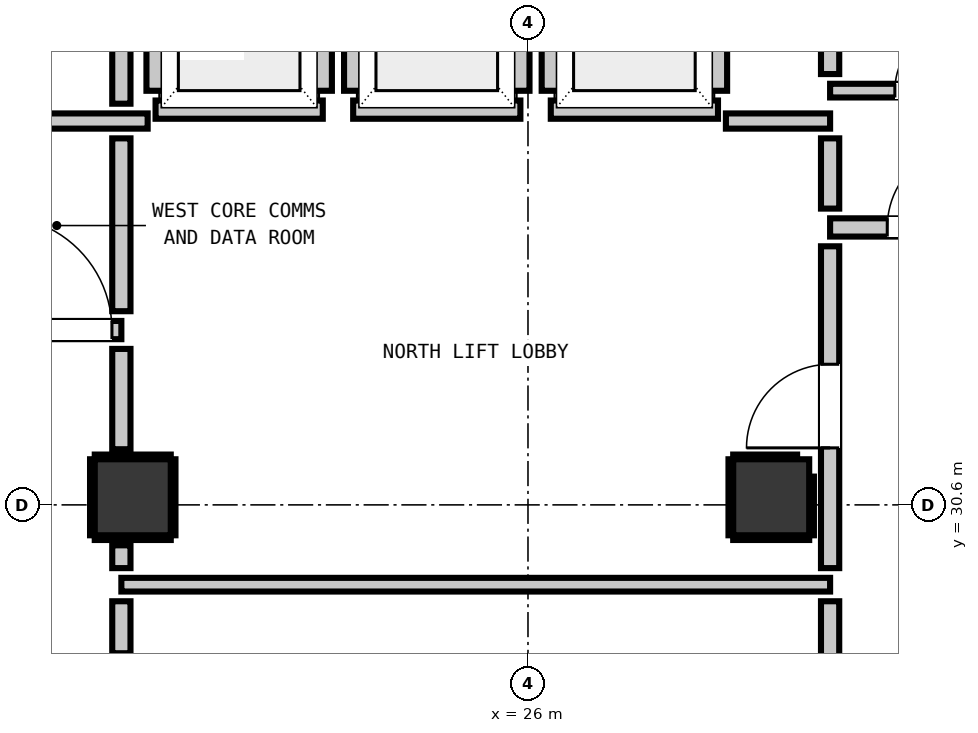
"""IFC4 building model, lengths in metres.
Left out: names, types, materials, properties, quantities, classifications, styles, units other than length and angle.
Written with IfcOpenShell. Run it as: python <this file> out.ifc"""

import sys

from ifc_helpers import new_model, si_unit, direction, frame, frame_2d, origin, origin_2d, place, context, subcontext, project, spatial, rectangle, extrude, element, fill, save


model = new_model("IFC4")
c1 = context("Model", 3, precision=1e-05, world=origin(), true_north=direction((0.0, 1.0)))
c2 = subcontext(c1, "Body", "Model", "MODEL_VIEW")
j1 = project(units=[si_unit("LENGTHUNIT", "METRE"), si_unit("PLANEANGLEUNIT", "RADIAN")], contexts=[c1])
p1 = place(None, origin())
s1 = spatial("IfcSite", under=j1, at=p1, CompositionType="ELEMENT")
p2 = place(p1, origin())
s2 = spatial("IfcBuilding", under=s1, at=p2, CompositionType="ELEMENT")
p3 = place(p2, frame((0.0, 0.0, 28.64)))
s3 = spatial("IfcBuildingStorey", under=s2, at=p3, CompositionType="ELEMENT", Elevation=28.64)
for number, where, z_axis, x_axis in (
    (1, (20.8, 30.7, 0.0), (0.0, 0.0, 1.0), (1.0, 0.0, 0.0)),
    (2, (29.2, 30.7, 0.0), (0.0, 0.0, 1.0), (1.0, 0.0, 0.0)),
):
    element("IfcColumn", number, at=place(p3, frame(where, z_axis=z_axis, x_axis=x_axis)), inside=s3, PredefinedType="COLUMN", context=c2, shape_type="SweptSolid", body=[
        extrude(rectangle(XDim=1.0, YDim=1.0, at=origin_2d()), origin(), (0.0, 0.0, 1.0), 3.32),
    ])
p4 = place(p3, frame((21.1, 35.8, 0.0), z_axis=(0.0, 0.0, 1.0), x_axis=(1.0, 0.0, 0.0)))
e3 = element("IfcWall", 3, at=p4, inside=s3, PredefinedType="PARTITIONING", context=c2, shape_type="SweptSolid", body=[
    extrude(rectangle(XDim=2.2, YDim=0.24, at=frame_2d((1.1, 0.0))), origin(), (0.0, 0.0, 1.0), 3.06),
])
p5 = place(p3, frame((21.1, 36.048, 0.0), z_axis=(0.0, 0.0, 1.0), x_axis=(0.0, 1.0, 0.0)))
e4 = element("IfcWall", 4, at=p5, inside=s3, PredefinedType="PARTITIONING", context=c2, shape_type="SweptSolid", body=[
    extrude(rectangle(XDim=2.104, YDim=0.24, at=frame_2d((1.052, 0.0))), origin(), (0.0, 0.0, 1.0), 2.295),
])
p6 = place(p3, frame((23.3, 36.048, 0.0), z_axis=(0.0, 0.0, 1.0), x_axis=(0.0, 1.0, 0.0)))
e5 = element("IfcWall", 5, at=p6, inside=s3, PredefinedType="PARTITIONING", context=c2, shape_type="SweptSolid", body=[
    extrude(rectangle(XDim=2.104, YDim=0.24, at=frame_2d((1.052, 0.0))), origin(), (0.0, 0.0, 1.0), 3.06),
])
p7 = place(p3, frame((23.7, 35.8, 0.0), z_axis=(0.0, 0.0, 1.0), x_axis=(1.0, 0.0, 0.0)))
e6 = element("IfcWall", 6, at=p7, inside=s3, PredefinedType="PARTITIONING", context=c2, shape_type="SweptSolid", body=[
    extrude(rectangle(XDim=2.2, YDim=0.24, at=frame_2d((1.1, 0.0))), origin(), (0.0, 0.0, 1.0), 3.06),
])
for number, where, z_axis, x_axis in (
    (7, (23.7, 36.048, 0.0), (0.0, 0.0, 1.0), (0.0, 1.0, 0.0)),
    (8, (25.9, 36.048, 0.0), (0.0, 0.0, 1.0), (0.0, 1.0, 0.0)),
):
    element("IfcWall", number, at=place(p3, frame(where, z_axis=z_axis, x_axis=x_axis)), inside=s3, PredefinedType="PARTITIONING", context=c2, shape_type="SweptSolid", body=[
        extrude(rectangle(XDim=2.104, YDim=0.24, at=frame_2d((1.052, 0.0))), origin(), (0.0, 0.0, 1.0), 3.06),
    ])
p8 = place(p3, frame((26.3, 35.8, 0.0), z_axis=(0.0, 0.0, 1.0), x_axis=(1.0, 0.0, 0.0)))
e9 = element("IfcWall", 9, at=p8, inside=s3, PredefinedType="PARTITIONING", context=c2, shape_type="SweptSolid", body=[
    extrude(rectangle(XDim=2.2, YDim=0.24, at=frame_2d((1.1, 0.0))), origin(), (0.0, 0.0, 1.0), 3.06),
])
for number, where, z_axis, x_axis in (
    (10, (26.3, 36.048, 0.0), (0.0, 0.0, 1.0), (0.0, 1.0, 0.0)),
    (11, (28.5, 36.048, 0.0), (0.0, 0.0, 1.0), (0.0, 1.0, 0.0)),
):
    element("IfcWall", number, at=place(p3, frame(where, z_axis=z_axis, x_axis=x_axis)), inside=s3, PredefinedType="PARTITIONING", context=c2, shape_type="SweptSolid", body=[
        extrude(rectangle(XDim=2.104, YDim=0.24, at=frame_2d((1.052, 0.0))), origin(), (0.0, 0.0, 1.0), 3.06),
    ])
p9 = place(p3, frame((17.45, 32.9, 0.0), z_axis=(0.0, 0.0, 1.0), x_axis=(1.0, 0.0, 0.0)))
e12 = element("IfcWall", 12, at=p9, inside=s3, PredefinedType="PARTITIONING", context=c2, shape_type="SweptSolid", body=[
    extrude(rectangle(XDim=3.2, YDim=0.24, at=frame_2d((1.6, 0.0))), origin(), (0.0, 0.0, 1.0), 3.06),
])
p10 = place(p9, frame((0.159, 0.0, 0.0)))
e13 = element("IfcOpeningElement", 13, at=p10, cuts=e12, PredefinedType="OPENING", context=c2, shape_type="SweptSolid", body=[
    extrude(rectangle(XDim=1.1, YDim=2.15, at=frame_2d((0.55, 1.075))), frame((0.0, 0.13, 0.0), z_axis=(0.0, -1.0, 0.0), x_axis=(1.0, 0.0, 0.0)), (0.0, 0.0, 1.0), 0.26),
])
p11 = place(p9, frame((1.576, 0.0, 0.0)))
e14 = element("IfcOpeningElement", 14, at=p11, cuts=e12, PredefinedType="OPENING", context=c2, shape_type="SweptSolid", body=[
    extrude(rectangle(XDim=1.5, YDim=2.15, at=frame_2d((0.75, 1.075))), frame((0.0, 0.13, 0.0), z_axis=(0.0, -1.0, 0.0), x_axis=(1.0, 0.0, 0.0)), (0.0, 0.0, 1.0), 0.26),
])
p12 = place(p3, frame((29.975, 34.25, 0.0), z_axis=(0.0, 0.0, 1.0), x_axis=(1.0, 0.0, 0.0)))
e15 = element("IfcWall", 15, at=p12, inside=s3, PredefinedType="PARTITIONING", context=c2, shape_type="SweptSolid", body=[
    extrude(rectangle(XDim=2.475, YDim=0.24, at=frame_2d((1.237, 0.0))), origin(), (0.0, 0.0, 1.0), 3.06),
])
p13 = place(p12, frame((0.752, 0.0, 0.0)))
e16 = element("IfcOpeningElement", 16, at=p13, cuts=e15, PredefinedType="OPENING", context=c2, shape_type="SweptSolid", body=[
    extrude(rectangle(XDim=1.1, YDim=2.15, at=frame_2d((0.55, 1.075))), frame((0.0, 0.13, 0.0), z_axis=(0.0, -1.0, 0.0), x_axis=(1.0, 0.0, 0.0)), (0.0, 0.0, 1.0), 0.26),
])
p14 = place(p3, frame((18.95, 35.65, 0.0), z_axis=(0.0, 0.0, 1.0), x_axis=(1.0, 0.0, 0.0)))
e17 = element("IfcWall", 17, at=p14, inside=s3, PredefinedType="PARTITIONING", context=c2, shape_type="SweptSolid", body=[
    extrude(rectangle(XDim=2.046, YDim=0.2, at=frame_2d((1.023, 0.0))), origin(), (0.0, 0.0, 1.0), 3.06),
])
p15 = place(p3, frame((28.604, 35.65, 0.0), z_axis=(0.0, 0.0, 1.0), x_axis=(1.0, 0.0, 0.0)))
e18 = element("IfcWall", 18, at=p15, inside=s3, PredefinedType="PARTITIONING", context=c2, shape_type="SweptSolid", body=[
    extrude(rectangle(XDim=1.371, YDim=0.2, at=frame_2d((0.686, 0.0))), origin(), (0.0, 0.0, 1.0), 3.06),
])
p16 = place(p3, frame((20.65, 29.55, 0.0), z_axis=(0.0, 0.0, 1.0), x_axis=(1.0, 0.0, 0.0)))
e19 = element("IfcWall", 19, at=p16, inside=s3, PredefinedType="PARTITIONING", context=c2, shape_type="SweptSolid", body=[
    extrude(rectangle(XDim=9.325, YDim=0.18, at=frame_2d((4.663, 0.0))), origin(), (0.0, 0.0, 1.0), 3.06),
])
p17 = place(p3, frame((29.975, 36.05, 0.0), z_axis=(0.0, 0.0, 1.0), x_axis=(1.0, 0.0, 0.0)))
e20 = element("IfcWall", 20, at=p17, inside=s3, PredefinedType="PARTITIONING", context=c2, shape_type="SweptSolid", body=[
    extrude(rectangle(XDim=2.505, YDim=0.18, at=frame_2d((1.252, 0.0))), origin(), (0.0, 0.0, 1.0), 3.06),
])
p18 = place(p17, frame((0.852, 0.0, 0.0)))
e21 = element("IfcOpeningElement", 21, at=p18, cuts=e20, PredefinedType="OPENING", context=c2, shape_type="SweptSolid", body=[
    extrude(rectangle(XDim=0.9, YDim=2.1, at=frame_2d((0.45, 1.05))), frame((0.0, 0.1, 0.0), z_axis=(0.0, -1.0, 0.0), x_axis=(1.0, 0.0, 0.0)), (0.0, 0.0, 1.0), 0.2),
])
p19 = place(p3, frame((20.65, 28.648, 0.0), z_axis=(0.0, 0.0, 1.0), x_axis=(0.0, 1.0, 0.0)))
e22 = element("IfcWall", 22, at=p19, inside=s3, PredefinedType="PARTITIONING", context=c2, shape_type="SweptSolid", body=[
    extrude(rectangle(XDim=0.684, YDim=0.24, at=frame_2d((0.342, 0.0))), origin(), (0.0, 0.0, 1.0), 2.295),
])
p20 = place(p3, frame((20.65, 29.768, 0.0), z_axis=(0.0, 0.0, 1.0), x_axis=(0.0, 1.0, 0.0)))
e23 = element("IfcWall", 23, at=p20, inside=s3, PredefinedType="PARTITIONING", context=c2, shape_type="SweptSolid", body=[
    extrude(rectangle(XDim=0.3, YDim=0.24, at=frame_2d((0.15, 0.0))), origin(), (0.0, 0.0, 1.0), 2.295),
])
p21 = place(p3, frame((20.65, 31.332, 0.0), z_axis=(0.0, 0.0, 1.0), x_axis=(0.0, 1.0, 0.0)))
e24 = element("IfcWall", 24, at=p21, inside=s3, PredefinedType="PARTITIONING", context=c2, shape_type="SweptSolid", body=[
    extrude(rectangle(XDim=1.32, YDim=0.24, at=frame_2d((0.66, 0.0))), origin(), (0.0, 0.0, 1.0), 2.295),
])
p22 = place(p3, frame((20.65, 33.148, 0.0), z_axis=(0.0, 0.0, 1.0), x_axis=(0.0, 1.0, 0.0)))
e25 = element("IfcWall", 25, at=p22, inside=s3, PredefinedType="PARTITIONING", context=c2, shape_type="SweptSolid", body=[
    extrude(rectangle(XDim=2.274, YDim=0.24, at=frame_2d((1.137, 0.0))), origin(), (0.0, 0.0, 1.0), 2.295),
])
p23 = place(p3, frame((20.65, 35.878, 0.0), z_axis=(0.0, 0.0, 1.0), x_axis=(0.0, 1.0, 0.0)))
e26 = element("IfcWall", 26, at=p23, inside=s3, PredefinedType="PARTITIONING", context=c2, shape_type="SweptSolid", body=[
    extrude(rectangle(XDim=2.674, YDim=0.24, at=frame_2d((1.337, 0.0))), origin(), (0.0, 0.0, 1.0), 2.295),
])
p24 = place(p3, frame((29.975, 25.648, 0.0), z_axis=(0.0, 0.0, 1.0), x_axis=(0.0, 1.0, 0.0)))
e27 = element("IfcWall", 27, at=p24, inside=s3, PredefinedType="PARTITIONING", context=c2, shape_type="SweptSolid", body=[
    extrude(rectangle(XDim=3.684, YDim=0.24, at=frame_2d((1.842, 0.0))), origin(), (0.0, 0.0, 1.0), 3.06),
])
p25 = place(p3, frame((29.975, 29.768, 0.0), z_axis=(0.0, 0.0, 1.0), x_axis=(0.0, 1.0, 0.0)))
e28 = element("IfcWall", 28, at=p25, inside=s3, PredefinedType="PARTITIONING", context=c2, shape_type="SweptSolid", body=[
    extrude(rectangle(XDim=4.234, YDim=0.24, at=frame_2d((2.117, 0.0))), origin(), (0.0, 0.0, 1.0), 3.06),
])
p26 = place(p25, frame((1.582, 0.0, 0.0)))
e29 = element("IfcOpeningElement", 29, at=p26, cuts=e28, PredefinedType="OPENING", context=c2, shape_type="SweptSolid", body=[
    extrude(rectangle(XDim=1.1, YDim=2.15, at=frame_2d((0.55, 1.075))), frame((0.0, 0.13, 0.0), z_axis=(0.0, -1.0, 0.0), x_axis=(1.0, 0.0, 0.0)), (0.0, 0.0, 1.0), 0.26),
])
p27 = place(p3, frame((29.975, 34.498, 0.0), z_axis=(0.0, 0.0, 1.0), x_axis=(0.0, 1.0, 0.0)))
e30 = element("IfcWall", 30, at=p27, inside=s3, PredefinedType="PARTITIONING", context=c2, shape_type="SweptSolid", body=[
    extrude(rectangle(XDim=0.924, YDim=0.24, at=frame_2d((0.462, 0.0))), origin(), (0.0, 0.0, 1.0), 3.06),
])
p28 = place(p3, frame((29.975, 36.268, 0.0), z_axis=(0.0, 0.0, 1.0), x_axis=(0.0, 1.0, 0.0)))
e31 = element("IfcWall", 31, at=p28, inside=s3, PredefinedType="PARTITIONING", context=c2, shape_type="SweptSolid", body=[
    extrude(rectangle(XDim=2.284, YDim=0.24, at=frame_2d((1.142, 0.0))), origin(), (0.0, 0.0, 1.0), 3.06),
])
for number, where, z_axis, x_axis in (
    (32, (20.3, 30.168, 0.0), (0.0, 0.0, 1.0), (1.0, 0.0, 0.0)),
    (33, (20.3, 31.232, 0.0), (0.0, 0.0, 1.0), (1.0, 0.0, 0.0)),
    (34, (20.268, 30.2, 0.0), (0.0, 0.0, 1.0), (0.0, 1.0, 0.0)),
    (35, (21.332, 30.2, 0.0), (0.0, 0.0, 1.0), (0.0, 1.0, 0.0)),
    (36, (28.7, 30.168, 0.0), (0.0, 0.0, 1.0), (1.0, 0.0, 0.0)),
):
    element("IfcWall", number, at=place(p3, frame(where, z_axis=z_axis, x_axis=x_axis)), inside=s3, PredefinedType="PARTITIONING", context=c2, shape_type="SweptSolid", body=[
        extrude(rectangle(XDim=1.0, YDim=0.06, at=frame_2d((0.5, 0.0))), origin(), (0.0, 0.0, 1.0), 1.45),
    ])
p29 = place(p3, frame((28.7, 31.232, 0.0), z_axis=(0.0, 0.0, 1.0), x_axis=(1.0, 0.0, 0.0)))
e37 = element("IfcWall", 37, at=p29, inside=s3, PredefinedType="PARTITIONING", context=c2, shape_type="SweptSolid", body=[
    extrude(rectangle(XDim=0.841, YDim=0.06, at=frame_2d((0.42, 0.0))), origin(), (0.0, 0.0, 1.0), 1.45),
])
p30 = place(p3, frame((28.668, 30.2, 0.0), z_axis=(0.0, 0.0, 1.0), x_axis=(0.0, 1.0, 0.0)))
e38 = element("IfcWall", 38, at=p30, inside=s3, PredefinedType="PARTITIONING", context=c2, shape_type="SweptSolid", body=[
    extrude(rectangle(XDim=1.0, YDim=0.06, at=frame_2d((0.5, 0.0))), origin(), (0.0, 0.0, 1.0), 1.45),
])
p31 = place(p3, frame((29.732, 30.2, 0.0), z_axis=(0.0, 0.0, 1.0), x_axis=(0.0, 1.0, 0.0)))
e39 = element("IfcWall", 39, at=p31, inside=s3, PredefinedType="PARTITIONING", context=c2, shape_type="SweptSolid", body=[
    extrude(rectangle(XDim=0.772, YDim=0.06, at=frame_2d((0.386, 0.0))), origin(), (0.0, 0.0, 1.0), 1.45),
])
p32 = place(p26, origin())
e40 = element("IfcDoor", 40, at=p32, inside=s3, OperationType="SINGLE_SWING_LEFT", PredefinedType="DOOR", context=c2, shape_type="SweptSolid", body=[
    extrude(rectangle(XDim=1.1, YDim=2.15, at=frame_2d((0.55, 1.075))), frame((0.0, 0.025, 0.0), z_axis=(0.0, -1.0, 0.0), x_axis=(1.0, 0.0, 0.0)), (0.0, 0.0, 1.0), 0.05),
])
fill(e29, e40)
p33 = place(p13, origin())
e41 = element("IfcDoor", 41, at=p33, inside=s3, OperationType="SINGLE_SWING_RIGHT", PredefinedType="DOOR", context=c2, shape_type="SweptSolid", body=[
    extrude(rectangle(XDim=1.1, YDim=2.15, at=frame_2d((0.55, 1.075))), frame((0.0, 0.025, 0.0), z_axis=(0.0, -1.0, 0.0), x_axis=(1.0, 0.0, 0.0)), (0.0, 0.0, 1.0), 0.05),
])
fill(e16, e41)
p34 = place(p11, origin())
e42 = element("IfcDoor", 42, at=p34, inside=s3, OperationType="SINGLE_SWING_LEFT", PredefinedType="DOOR", context=c2, shape_type="SweptSolid", body=[
    extrude(rectangle(XDim=1.5, YDim=2.15, at=frame_2d((0.75, 1.075))), frame((0.0, 0.025, 0.0), z_axis=(0.0, -1.0, 0.0), x_axis=(1.0, 0.0, 0.0)), (0.0, 0.0, 1.0), 0.05),
])
fill(e14, e42)
p35 = place(p18, origin())
e43 = element("IfcDoor", 43, at=p35, inside=s3, OperationType="SINGLE_SWING_RIGHT", PredefinedType="DOOR", context=c2, shape_type="SweptSolid", body=[
    extrude(rectangle(XDim=0.9, YDim=2.1, at=frame_2d((0.45, 1.05))), frame((0.0, 0.025, 0.0), z_axis=(0.0, -1.0, 0.0), x_axis=(1.0, 0.0, 0.0)), (0.0, 0.0, 1.0), 0.05),
])
fill(e21, e43)
save(model, sys.argv[1])
